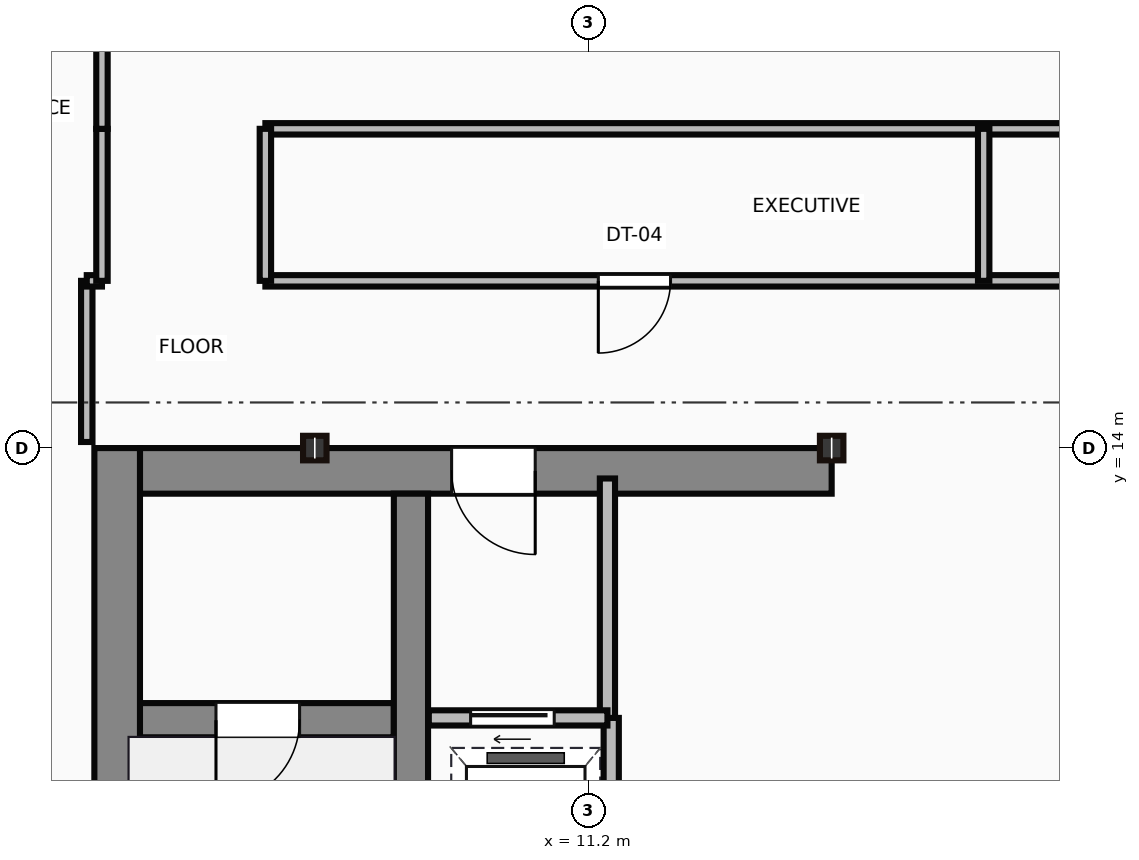
"""IFC4 building model, lengths in metres.
Left out: names, types, materials, properties, quantities, classifications, styles, units other than length and angle.
Written with IfcOpenShell. Run it as: python <this file> out.ifc"""

import sys

from ifc_helpers import new_model, si_unit, direction, frame, frame_2d, origin, origin_2d, place, context, subcontext, project, spatial, rectangle, i_section, extrude, source, transform, mapped, element, fill, save


model = new_model("IFC4")
c1 = context("Model", 3, precision=1e-05, world=origin(), true_north=direction((0.0, 1.0)))
c2 = subcontext(c1, "Body", "Model", "MODEL_VIEW")
j1 = project(units=[si_unit("LENGTHUNIT", "METRE"), si_unit("PLANEANGLEUNIT", "RADIAN")], contexts=[c1])
p1 = place(None, origin())
s1 = spatial("IfcSite", under=j1, at=p1, CompositionType="ELEMENT")
p2 = place(p1, origin())
s2 = spatial("IfcBuilding", under=s1, at=p2, CompositionType="ELEMENT")
p3 = place(p2, frame((0.0, 0.0, 240.55)))
s3 = spatial("IfcBuildingStorey", under=s2, at=p3, CompositionType="ELEMENT", Elevation=240.55)
m1 = source(origin(), c2, "Body", "SweptSolid", [
    extrude(rectangle(XDim=13.1, YDim=0.6, at=frame_2d((6.55, 0.0))), origin(), (0.0, 0.0, 1.0), 3.65),
])
p4 = place(p3, frame((5.0, 0.9, 0.0), z_axis=(0.0, 0.0, 1.0), x_axis=(0.0, 1.0, 0.0)))
e1 = element("IfcWall", 1, at=p4, inside=s3, PredefinedType="SHEAR", context=c2, shape_type="MappedRepresentation", body=[
    mapped(m1, transform((0.0, 0.0, 0.0))),
])
m2 = source(origin(), c2, "Body", "SweptSolid", [
    extrude(rectangle(XDim=9.1, YDim=0.6, at=frame_2d((4.55, 0.0))), origin(), (0.0, 0.0, 1.0), 3.65),
])
p5 = place(p3, frame((5.3, 13.7, 0.0), z_axis=(0.0, 0.0, 1.0), x_axis=(1.0, 0.0, 0.0)))
e2 = element("IfcWall", 2, at=p5, inside=s3, PredefinedType="SHEAR", context=c2, shape_type="MappedRepresentation", body=[
    mapped(m2, transform((0.0, 0.0, 0.0))),
])
p6 = place(p5, frame((4.1, 0.0, 0.0)))
e3 = element("IfcOpeningElement", 3, at=p6, cuts=e2, PredefinedType="OPENING", context=c2, shape_type="SweptSolid", body=[
    extrude(rectangle(XDim=1.1, YDim=2.15, at=frame_2d((0.55, 1.075))), frame((0.0, 0.31, 0.0), z_axis=(0.0, -1.0, 0.0), x_axis=(1.0, 0.0, 0.0)), (0.0, 0.0, 1.0), 0.62),
])
m3 = source(origin(), c2, "Body", "SweptSolid", [
    extrude(rectangle(XDim=12.5, YDim=0.45, at=frame_2d((6.25, 0.0))), origin(), (0.0, 0.0, 1.0), 3.65),
])
p7 = place(p3, frame((8.865, 0.9, 0.0), z_axis=(0.0, 0.0, 1.0), x_axis=(0.0, 1.0, 0.0)))
e4 = element("IfcWall", 4, at=p7, inside=s3, PredefinedType="SHEAR", context=c2, shape_type="MappedRepresentation", body=[
    mapped(m3, transform((0.0, 0.0, 0.0))),
])
m4 = source(origin(), c2, "Body", "SweptSolid", [
    extrude(rectangle(XDim=3.39, YDim=0.45, at=frame_2d((1.695, 0.0))), origin(), (0.0, 0.0, 1.0), 3.65),
])
p8 = place(p3, frame((5.25, 10.42, 0.0), z_axis=(0.0, 0.0, 1.0), x_axis=(1.0, 0.0, 0.0)))
e5 = element("IfcWall", 5, at=p8, inside=s3, PredefinedType="SHEAR", context=c2, shape_type="MappedRepresentation", body=[
    mapped(m4, transform((0.0, 0.0, 0.0))),
])
p9 = place(p8, frame((1.05, 0.0, 0.0)))
e6 = element("IfcOpeningElement", 6, at=p9, cuts=e5, PredefinedType="OPENING", context=c2, shape_type="SweptSolid", body=[
    extrude(rectangle(XDim=1.1, YDim=2.15, at=frame_2d((0.55, 1.075))), frame((0.0, 0.235, 0.0), z_axis=(0.0, -1.0, 0.0), x_axis=(1.0, 0.0, 0.0)), (0.0, 0.0, 1.0), 0.47),
])
m5 = source(origin(), c2, "Body", "SweptSolid", [
    extrude(i_section(OverallWidth=0.309, OverallDepth=0.323, WebThickness=0.014, FlangeThickness=0.023, at=origin_2d()), origin(), (0.0, 0.0, 1.0), 3.65),
])
for number, where, z_axis, x_axis in (
    (7, (7.6, 14.0, 0.0), (0.0, 0.0, 1.0), (1.0, 0.0, 0.0)),
    (8, (14.4, 14.0, 0.0), (0.0, 0.0, 1.0), (1.0, 0.0, 0.0)),
):
    element("IfcColumn", number, at=place(p3, frame(where, z_axis=z_axis, x_axis=x_axis)), inside=s3, PredefinedType="COLUMN", context=c2, shape_type="MappedRepresentation", body=[
        mapped(m5, transform((0.0, 0.0, 0.0))),
    ])
m6 = source(origin(), c2, "Body", "SweptSolid", [
    extrude(rectangle(XDim=3.18, YDim=0.2, at=frame_2d((1.59, 0.0))), origin(), (0.0, 0.0, 1.0), 3.4),
])
p10 = place(p3, frame((11.45, 10.42, 0.0), z_axis=(0.0, 0.0, 1.0), x_axis=(0.0, 1.0, 0.0)))
e9 = element("IfcWall", 9, at=p10, inside=s3, PredefinedType="PARTITIONING", context=c2, shape_type="MappedRepresentation", body=[
    mapped(m6, transform((0.0, 0.0, 0.0))),
])
m7 = source(origin(), c2, "Body", "SweptSolid", [
    extrude(rectangle(XDim=2.35, YDim=0.2, at=frame_2d((1.175, 0.0))), origin(), (0.0, 0.0, 1.0), 3.4),
])
p11 = place(p3, frame((9.1, 10.45, 0.0), z_axis=(0.0, 0.0, 1.0), x_axis=(1.0, 0.0, 0.0)))
e10 = element("IfcWall", 10, at=p11, inside=s3, PredefinedType="PARTITIONING", context=c2, shape_type="MappedRepresentation", body=[
    mapped(m7, transform((0.0, 0.0, 0.0))),
])
p12 = place(p11, frame((0.55, 0.0, 0.0)))
e11 = element("IfcOpeningElement", 11, at=p12, cuts=e10, PredefinedType="OPENING", context=c2, shape_type="SweptSolid", body=[
    extrude(rectangle(XDim=1.1, YDim=2.15, at=frame_2d((0.55, 1.075))), frame((0.0, 0.11, 0.0), z_axis=(0.0, -1.0, 0.0), x_axis=(1.0, 0.0, 0.0)), (0.0, 0.0, 1.0), 0.22),
])
m8 = source(origin(), c2, "Body", "SweptSolid", [
    extrude(rectangle(XDim=9.6, YDim=0.2, at=frame_2d((4.8, 0.0))), origin(), (0.0, 0.0, 1.0), 3.4),
])
p13 = place(p3, frame((11.5, 0.85, 0.0), z_axis=(0.0, 0.0, 1.0), x_axis=(0.0, 1.0, 0.0)))
e12 = element("IfcWall", 12, at=p13, inside=s3, PredefinedType="PARTITIONING", context=c2, shape_type="MappedRepresentation", body=[
    mapped(m8, transform((0.0, 0.0, 0.0))),
])
p14 = place(p13, frame((4.2, 0.0, 0.0)))
e13 = element("IfcOpeningElement", 13, at=p14, cuts=e12, PredefinedType="OPENING", context=c2, shape_type="SweptSolid", body=[
    extrude(rectangle(XDim=1.1, YDim=2.15, at=frame_2d((0.55, 1.075))), frame((0.0, 0.11, 0.0), z_axis=(0.0, -1.0, 0.0), x_axis=(1.0, 0.0, 0.0)), (0.0, 0.0, 1.0), 0.22),
])
p15 = place(p13, frame((0.9, 0.0, 0.0)))
e14 = element("IfcOpeningElement", 14, at=p15, cuts=e12, PredefinedType="OPENING", context=c2, shape_type="SweptSolid", body=[
    extrude(rectangle(XDim=1.2, YDim=2.15, at=frame_2d((0.6, 1.075))), frame((0.0, 0.11, 0.0), z_axis=(0.0, -1.0, 0.0), x_axis=(1.0, 0.0, 0.0)), (0.0, 0.0, 1.0), 0.22),
])
m9 = source(origin(), c2, "Body", "SweptSolid", [
    extrude(rectangle(XDim=2.12, YDim=0.15, at=frame_2d((1.06, 0.0))), origin(), (0.0, 0.0, 1.0), 3.4),
])
p16 = place(p3, frame((4.6, 14.08, 0.0), z_axis=(0.0, 0.0, 1.0), x_axis=(0.0, 1.0, 0.0)))
e15 = element("IfcWall", 15, at=p16, inside=s3, PredefinedType="PARTITIONING", context=c2, shape_type="MappedRepresentation", body=[
    mapped(m9, transform((0.0, 0.0, 0.0))),
])
m10 = source(origin(), c2, "Body", "SweptSolid", [
    extrude(rectangle(XDim=0.2, YDim=0.15, at=frame_2d((0.1, 0.0))), origin(), (0.0, 0.0, 1.0), 3.4),
])
p17 = place(p3, frame((4.6, 16.2, 0.0), z_axis=(0.0, 0.0, 1.0), x_axis=(1.0, 0.0, 0.0)))
e16 = element("IfcWall", 16, at=p17, inside=s3, PredefinedType="PARTITIONING", context=c2, shape_type="MappedRepresentation", body=[
    mapped(m10, transform((0.0, 0.0, 0.0))),
])
m11 = source(origin(), c2, "Body", "SweptSolid", [
    extrude(rectangle(XDim=2.0, YDim=0.15, at=frame_2d((1.0, 0.0))), origin(), (0.0, 0.0, 1.0), 3.4),
])
for number, where, z_axis, x_axis in (
    (17, (4.8, 16.2, 0.0), (0.0, 0.0, 1.0), (0.0, 1.0, 0.0)),
    (18, (4.8, 18.2, 0.0), (0.0, 0.0, 1.0), (0.0, 1.0, 0.0)),
):
    element("IfcWall", number, at=place(p3, frame(where, z_axis=z_axis, x_axis=x_axis)), inside=s3, PredefinedType="PARTITIONING", context=c2, shape_type="MappedRepresentation", body=[
        mapped(m11, transform((0.0, 0.0, 0.0))),
    ])
m12 = source(origin(), c2, "Body", "SweptSolid", [
    extrude(rectangle(XDim=23.25, YDim=0.15, at=frame_2d((11.625, 0.0))), origin(), (0.0, 0.0, 1.0), 3.4),
])
p18 = place(p3, frame((6.95, 16.2, 0.0), z_axis=(0.0, 0.0, 1.0), x_axis=(1.0, 0.0, 0.0)))
e19 = element("IfcWall", 19, at=p18, inside=s3, PredefinedType="PARTITIONING", context=c2, shape_type="MappedRepresentation", body=[
    mapped(m12, transform((0.0, 0.0, 0.0))),
])
p19 = place(p18, frame((4.38, 0.0, 0.0)))
e20 = element("IfcOpeningElement", 20, at=p19, cuts=e19, PredefinedType="OPENING", context=c2, shape_type="SweptSolid", body=[
    extrude(rectangle(XDim=0.95, YDim=2.15, at=frame_2d((0.475, 1.075))), frame((0.0, 0.085, 0.0), z_axis=(0.0, -1.0, 0.0), x_axis=(1.0, 0.0, 0.0)), (0.0, 0.0, 1.0), 0.17),
])
p20 = place(p18, frame((15.745, 0.0, 0.0)))
e21 = element("IfcOpeningElement", 21, at=p20, cuts=e19, PredefinedType="OPENING", context=c2, shape_type="SweptSolid", body=[
    extrude(rectangle(XDim=0.95, YDim=2.15, at=frame_2d((0.475, 1.075))), frame((0.0, 0.085, 0.0), z_axis=(0.0, -1.0, 0.0), x_axis=(1.0, 0.0, 0.0)), (0.0, 0.0, 1.0), 0.17),
])
p21 = place(p3, frame((30.2, 18.2, 0.0), z_axis=(0.0, 0.0, 1.0), x_axis=(-1.0, 0.0, 0.0)))
e22 = element("IfcWall", 22, at=p21, inside=s3, PredefinedType="PARTITIONING", context=c2, shape_type="MappedRepresentation", body=[
    mapped(m12, transform((0.0, 0.0, 0.0))),
])
for number, where, z_axis, x_axis in (
    (23, (6.95, 18.2, 0.0), (0.0, 0.0, 1.0), (0.0, -1.0, 0.0)),
    (24, (16.4, 18.2, 0.0), (0.0, 0.0, 1.0), (0.0, -1.0, 0.0)),
):
    element("IfcWall", number, at=place(p3, frame(where, z_axis=z_axis, x_axis=x_axis)), inside=s3, PredefinedType="PARTITIONING", context=c2, shape_type="MappedRepresentation", body=[
        mapped(m11, transform((0.0, 0.0, 0.0))),
    ])
m13 = source(origin(), c2, "Body", "SweptSolid", [
    extrude(rectangle(XDim=1.1, YDim=2.15, at=frame_2d((0.55, 1.075))), frame((0.0, 0.025, 0.0), z_axis=(0.0, -1.0, 0.0), x_axis=(1.0, 0.0, 0.0)), (0.0, 0.0, 1.0), 0.05),
])
p22 = place(p9, frame((1.1, 0.0, 0.0), z_axis=(0.0, 0.0, 1.0), x_axis=(-1.0, 0.0, 0.0)))
e25 = element("IfcDoor", 25, at=p22, inside=s3, OperationType="SINGLE_SWING_LEFT", PredefinedType="DOOR", context=c2, shape_type="MappedRepresentation", body=[
    mapped(m13, transform((0.0, 0.0, 0.0))),
])
fill(e6, e25)
p23 = place(p6, origin())
e26 = element("IfcDoor", 26, at=p23, inside=s3, OperationType="SINGLE_SWING_RIGHT", PredefinedType="DOOR", context=c2, shape_type="MappedRepresentation", body=[
    mapped(m13, transform((0.0, 0.0, 0.0))),
])
fill(e3, e26)
p24 = place(p12, origin())
e27 = element("IfcDoor", 27, at=p24, inside=s3, OperationType="SLIDING_TO_LEFT", PredefinedType="DOOR", context=c2, shape_type="MappedRepresentation", body=[
    mapped(m13, transform((0.0, 0.0, 0.0))),
])
fill(e11, e27)
m14 = source(origin(), c2, "Body", "SweptSolid", [
    extrude(rectangle(XDim=0.95, YDim=2.15, at=frame_2d((0.475, 1.075))), frame((0.0, 0.025, 0.0), z_axis=(0.0, -1.0, 0.0), x_axis=(1.0, 0.0, 0.0)), (0.0, 0.0, 1.0), 0.05),
])
p25 = place(p19, origin())
e28 = element("IfcDoor", 28, at=p25, inside=s3, OperationType="SINGLE_SWING_LEFT", PredefinedType="DOOR", context=c2, shape_type="MappedRepresentation", body=[
    mapped(m14, transform((0.0, 0.0, 0.0))),
])
fill(e20, e28)
save(model, sys.argv[1])
